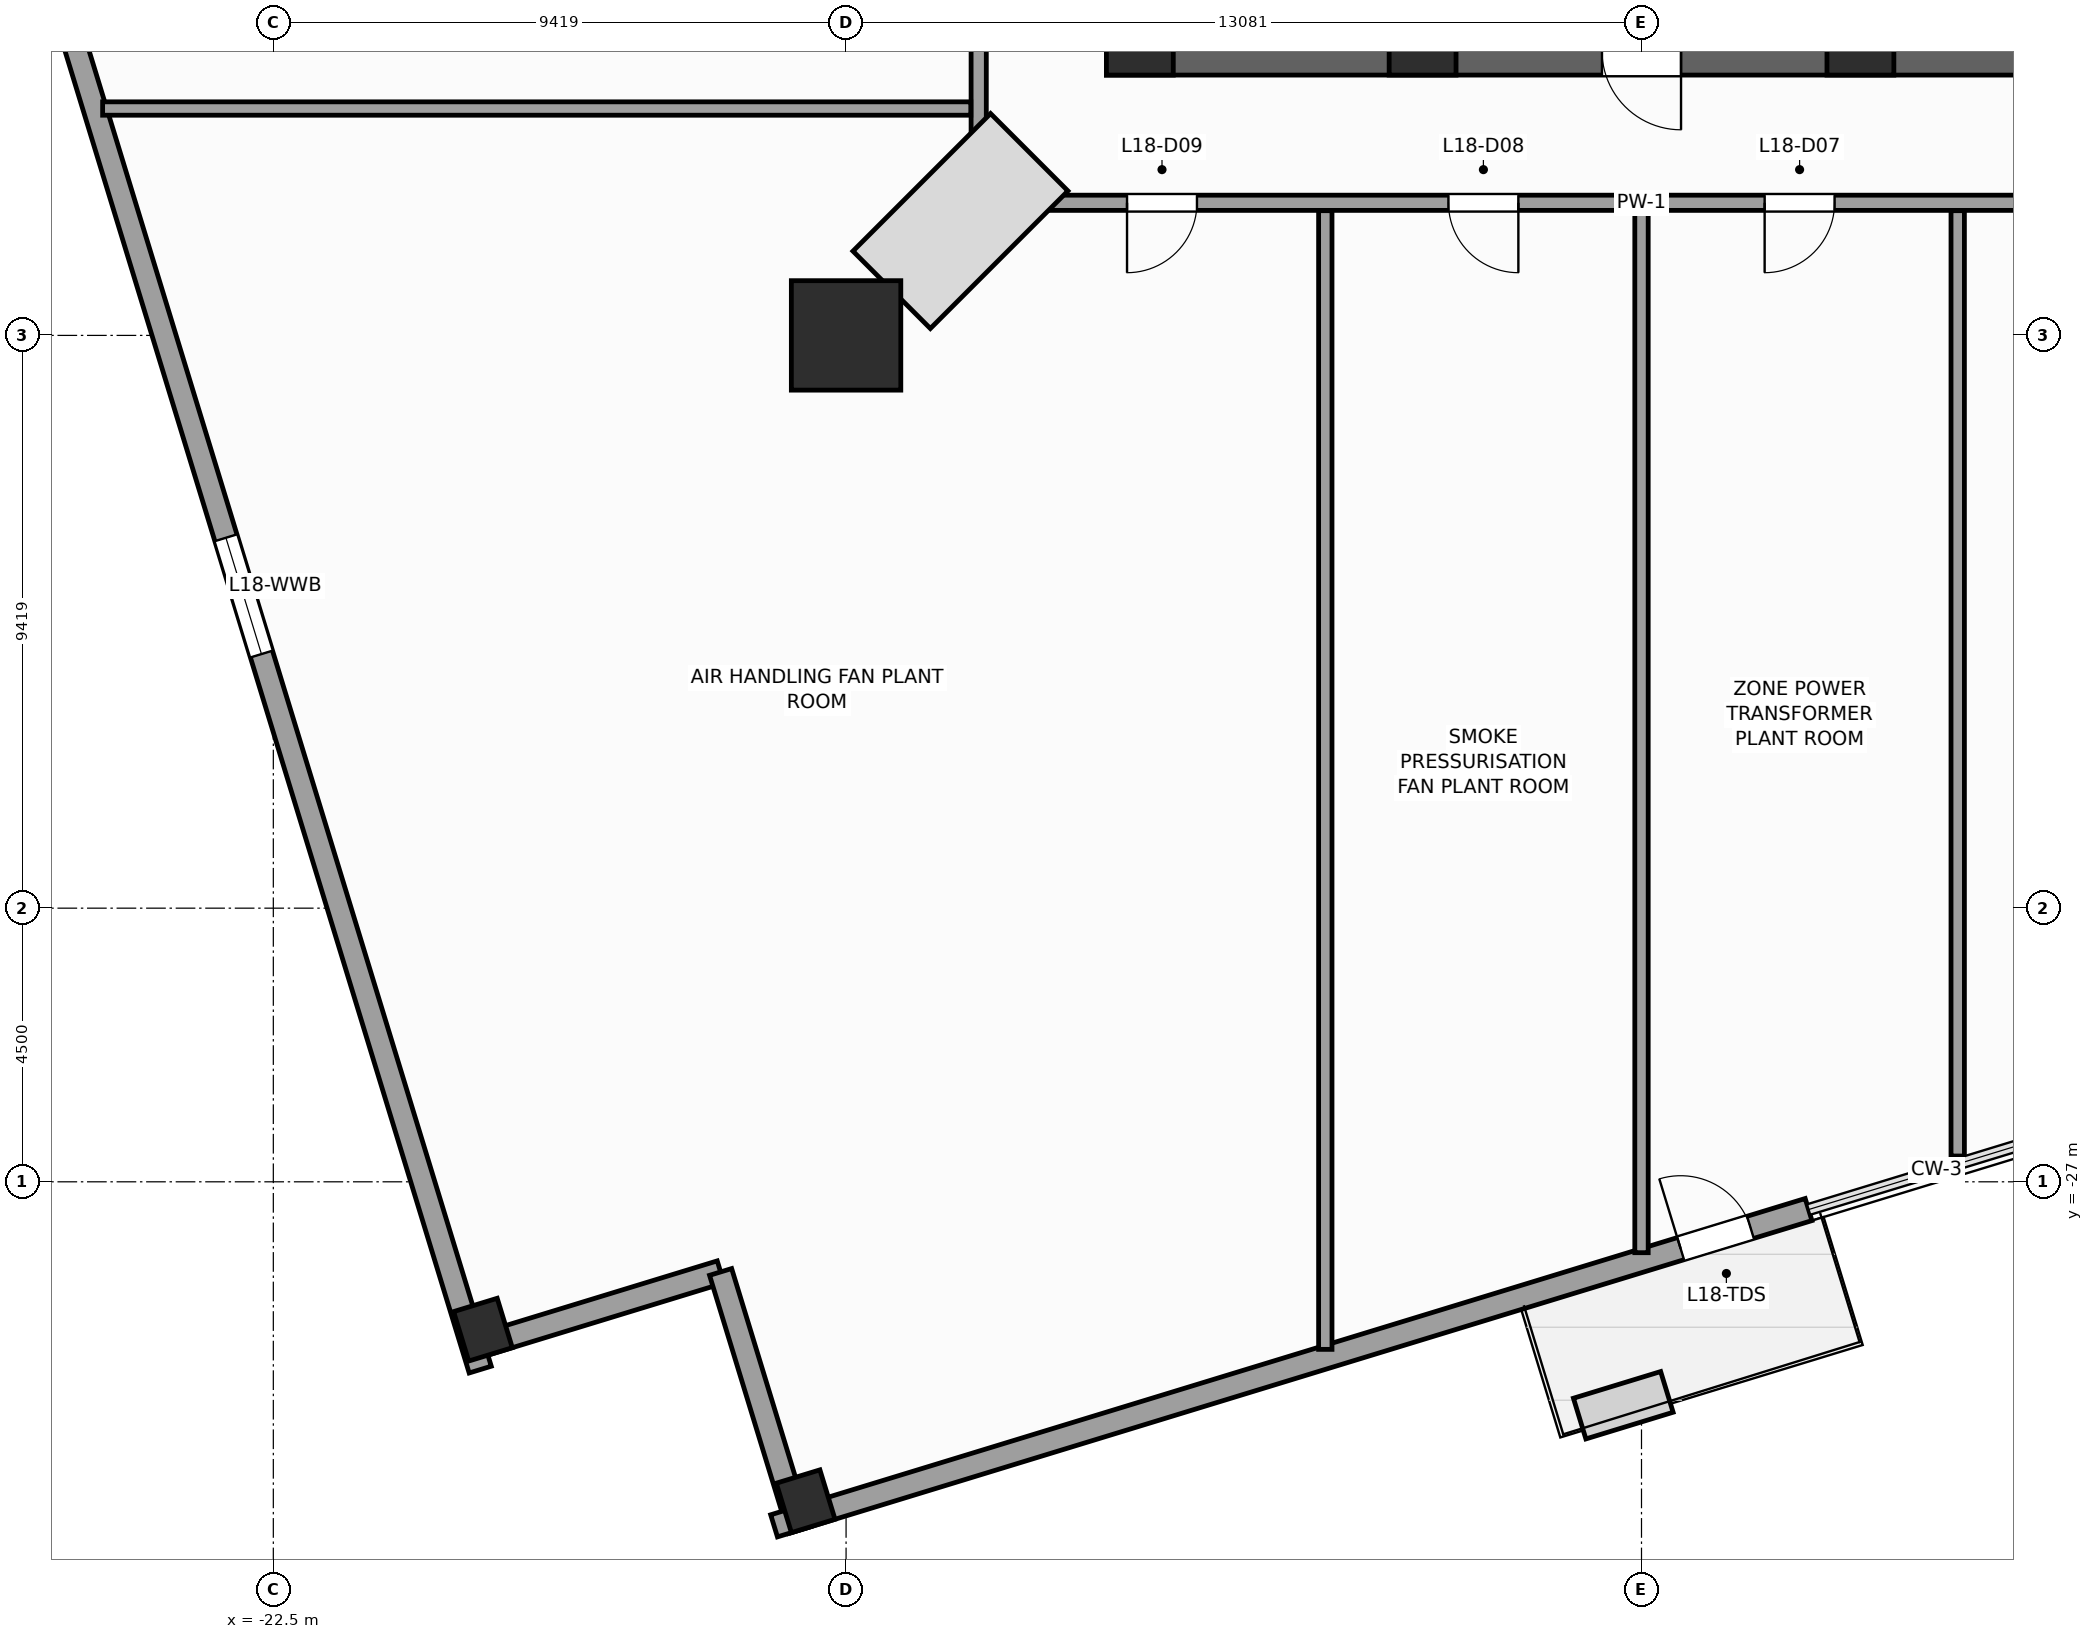
"""IFC4 building model, lengths in metres.
Left out: names, types, materials, properties, quantities, classifications, styles, units other than length and angle.
Written with IfcOpenShell. Run it as: python <this file> out.ifc"""

import sys

from ifc_helpers import new_model, si_unit, direction, frame, frame_2d, origin, origin_2d, place, context, subcontext, project, spatial, rectangle, extrude, source, transform, mapped, element, fill, save


model = new_model("IFC4")
c1 = context("Model", 3, precision=1e-05, world=origin(), true_north=direction((0.0, 1.0)))
c2 = subcontext(c1, "Body", "Model", "MODEL_VIEW")
j1 = project(units=[si_unit("LENGTHUNIT", "METRE"), si_unit("PLANEANGLEUNIT", "RADIAN")], contexts=[c1])
p1 = place(None, origin())
s1 = spatial("IfcSite", under=j1, at=p1, CompositionType="ELEMENT")
p2 = place(p1, origin())
s2 = spatial("IfcBuilding", under=s1, at=p2, CompositionType="ELEMENT")
p3 = place(p2, frame((0.0, 0.0, 78.0)))
s3 = spatial("IfcBuildingStorey", under=s2, at=p3, CompositionType="ELEMENT", Elevation=78.0)
p4 = place(p3, frame((-8.8, -8.4, 0.0), z_axis=(0.0, 0.0, 1.0), x_axis=(1.0, 0.0, 0.0)))
e1 = element("IfcWall", 1, at=p4, inside=s3, PredefinedType="SHEAR", context=c2, shape_type="SweptSolid", body=[
    extrude(rectangle(XDim=17.6, YDim=0.8, at=frame_2d((8.8, 0.0))), origin(), (0.0, 0.0, 1.0), 5.2),
])
p5 = place(p4, frame((8.15, 0.0, 0.0)))
e2 = element("IfcOpeningElement", 2, at=p5, cuts=e1, PredefinedType="OPENING", context=c2, shape_type="SweptSolid", body=[
    extrude(rectangle(XDim=1.3, YDim=2.2, at=frame_2d((0.65, 1.1))), frame((0.0, 0.41, 0.0), z_axis=(0.0, -1.0, 0.0), x_axis=(1.0, 0.0, 0.0)), (0.0, 0.0, 1.0), 0.82),
])
m1 = source(origin(), c2, "Body", "SweptSolid", [
    extrude(rectangle(XDim=1.1, YDim=1.1, at=origin_2d()), origin(), (0.0, 0.0, 1.0), 5.2),
])
for number, where, z_axis, x_axis in (
    (3, (-8.25, -8.25, 0.0), (0.0, 0.0, 1.0), (1.0, 0.0, 0.0)),
    (4, (-3.6, -8.25, 0.0), (0.0, 0.0, 1.0), (1.0, 0.0, 0.0)),
    (5, (3.6, -8.25, 0.0), (0.0, 0.0, 1.0), (1.0, 0.0, 0.0)),
):
    element("IfcColumn", number, at=place(p3, frame(where, z_axis=z_axis, x_axis=x_axis)), inside=s3, PredefinedType="PILASTER", context=c2, shape_type="MappedRepresentation", body=[
        mapped(m1, transform((0.0, 0.0, 0.0), scale=1.0)),
    ])
m2 = source(origin(), c2, "Body", "SweptSolid", [
    extrude(rectangle(XDim=1.8, YDim=1.8, at=origin_2d()), origin(), (0.0, 0.0, 1.0), 5.2),
])
p6 = place(p3, frame((-13.081, -13.081, 0.0), z_axis=(0.0, 0.0, 1.0), x_axis=(1.0, 0.0, 0.0)))
e6 = element("IfcColumn", 6, at=p6, inside=s3, PredefinedType="COLUMN", context=c2, shape_type="MappedRepresentation", body=[
    mapped(m2, transform((0.0, 0.0, 0.0), scale=1.0)),
])
m3 = source(origin(), c2, "Body", "SweptSolid", [
    extrude(rectangle(XDim=0.75, YDim=0.85, at=origin_2d()), origin(), (0.0, 0.0, 1.0), 5.2),
])
for number, where, z_axis, x_axis in (
    (7, (-13.746, -32.253, 0.0), (0.0, 0.0, 1.0), (0.956, 0.292, 0.0)),
    (8, (-19.052, -29.431, 0.0), (0.0, 0.0, 1.0), (0.956, 0.292, 0.0)),
):
    element("IfcColumn", number, at=place(p3, frame(where, z_axis=z_axis, x_axis=x_axis)), inside=s3, PredefinedType="COLUMN", context=c2, shape_type="MappedRepresentation", body=[
        mapped(m3, transform((0.0, 0.0, 0.0), scale=1.0)),
    ])
p7 = place(p3, frame((-19.208, -29.725, 0.0), z_axis=(0.0, 0.0, 1.0), x_axis=(0.956312764915, 0.292345507338, 0.0)))
e9 = element("IfcWall", 9, at=p7, inside=s3, PredefinedType="STANDARD", context=c2, shape_type="SweptSolid", body=[
    extrude(rectangle(XDim=4.25, YDim=0.38, at=frame_2d((2.125, 0.0))), origin(), (0.0, 0.0, 1.0), 4.94),
])
p8 = place(p3, frame((-15.144, -28.482, 0.0), z_axis=(0.0, 0.0, 1.0), x_axis=(0.292373601522, -0.956304176051, 0.0)))
e10 = element("IfcWall", 10, at=p8, inside=s3, PredefinedType="STANDARD", context=c2, shape_type="SweptSolid", body=[
    extrude(rectangle(XDim=4.44, YDim=0.38, at=frame_2d((2.22, 0.0))), origin(), (0.0, 0.0, 1.0), 4.24),
])
p9 = place(p3, frame((-14.265, -32.658, 0.0), z_axis=(0.0, 0.0, 1.0), x_axis=(0.956302978664, 0.292377517944, 0.0)))
e11 = element("IfcWall", 11, at=p9, inside=s3, PredefinedType="STANDARD", context=c2, shape_type="SweptSolid", body=[
    extrude(rectangle(XDim=17.79, YDim=0.38, at=frame_2d((8.895, 0.0))), origin(), (0.0, 0.0, 1.0), 4.34),
])
p10 = place(p9, frame((15.59, 0.0, 0.0)))
e12 = element("IfcOpeningElement", 12, at=p10, cuts=e11, PredefinedType="OPENING", context=c2, shape_type="SweptSolid", body=[
    extrude(rectangle(XDim=1.2, YDim=2.3, at=frame_2d((0.6, 1.15))), frame((0.0, 0.2, 0.0), z_axis=(0.0, -1.0, 0.0), x_axis=(1.0, 0.0, 0.0)), (0.0, 0.0, 1.0), 0.4),
])
p11 = place(p3, frame((-26.17, -6.955, 0.0), z_axis=(0.0, 0.0, 1.0), x_axis=(0.292372634538, -0.95630447169, 0.0)))
e13 = element("IfcWall", 13, at=p11, inside=s3, PredefinedType="STANDARD", context=c2, shape_type="SweptSolid", body=[
    extrude(rectangle(XDim=24.19, YDim=0.38, at=frame_2d((12.095, 0.0))), origin(), (0.0, 0.0, 1.0), 4.34),
])
p12 = place(p11, frame((9.885, 0.0, 0.65)))
e14 = element("IfcOpeningElement", 14, at=p12, cuts=e13, PredefinedType="OPENING", context=c2, shape_type="SweptSolid", body=[
    extrude(rectangle(XDim=2.0, YDim=1.45, at=frame_2d((1.0, 0.725))), frame((0.0, 0.2, 0.0), z_axis=(0.0, -1.0, 0.0), x_axis=(1.0, 0.0, 0.0)), (0.0, 0.0, 1.0), 0.4),
])
p13 = place(p3, frame((-10.9, -10.9, 0.0), z_axis=(0.0, 0.0, 1.0), x_axis=(1.0, 0.0, 0.0)))
e15 = element("IfcWall", 15, at=p13, inside=s3, PredefinedType="PARTITIONING", context=c2, shape_type="SweptSolid", body=[
    extrude(rectangle(XDim=21.8, YDim=0.25, at=frame_2d((10.9, 0.0))), origin(), (0.0, 0.0, 1.0), 4.94),
])
p14 = place(p13, frame((18.21, 0.0, 0.0)))
e16 = element("IfcOpeningElement", 16, at=p14, cuts=e15, PredefinedType="OPENING", context=c2, shape_type="SweptSolid", body=[
    extrude(rectangle(XDim=1.15, YDim=2.25, at=frame_2d((0.575, 1.125))), frame((0.0, 0.135, 0.0), z_axis=(0.0, -1.0, 0.0), x_axis=(1.0, 0.0, 0.0)), (0.0, 0.0, 1.0), 0.27),
])
p15 = place(p13, frame((12.925, 0.0, 0.0)))
e17 = element("IfcOpeningElement", 17, at=p15, cuts=e15, PredefinedType="OPENING", context=c2, shape_type="SweptSolid", body=[
    extrude(rectangle(XDim=1.15, YDim=2.25, at=frame_2d((0.575, 1.125))), frame((0.0, 0.135, 0.0), z_axis=(0.0, -1.0, 0.0), x_axis=(1.0, 0.0, 0.0)), (0.0, 0.0, 1.0), 0.27),
])
p16 = place(p13, frame((7.725, 0.0, 0.0)))
e18 = element("IfcOpeningElement", 18, at=p16, cuts=e15, PredefinedType="OPENING", context=c2, shape_type="SweptSolid", body=[
    extrude(rectangle(XDim=1.15, YDim=2.25, at=frame_2d((0.575, 1.125))), frame((0.0, 0.135, 0.0), z_axis=(0.0, -1.0, 0.0), x_axis=(1.0, 0.0, 0.0)), (0.0, 0.0, 1.0), 0.27),
])
p17 = place(p13, frame((2.439, 0.0, 0.0)))
e19 = element("IfcOpeningElement", 19, at=p17, cuts=e15, PredefinedType="OPENING", context=c2, shape_type="SweptSolid", body=[
    extrude(rectangle(XDim=1.15, YDim=2.25, at=frame_2d((0.575, 1.125))), frame((0.0, 0.135, 0.0), z_axis=(0.0, -1.0, 0.0), x_axis=(1.0, 0.0, 0.0)), (0.0, 0.0, 1.0), 0.27),
])
p18 = place(p3, frame((-10.9, -10.8, 0.0), z_axis=(0.0, 0.0, 1.0), x_axis=(0.0, 1.0, 0.0)))
e20 = element("IfcWall", 20, at=p18, inside=s3, PredefinedType="PARTITIONING", context=c2, shape_type="SweptSolid", body=[
    extrude(rectangle(XDim=21.6, YDim=0.25, at=frame_2d((10.8, 0.0))), origin(), (0.0, 0.0, 1.0), 4.94),
])
p19 = place(p18, frame((8.95, 0.0, 0.0)))
e21 = element("IfcOpeningElement", 21, at=p19, cuts=e20, PredefinedType="OPENING", context=c2, shape_type="SweptSolid", body=[
    extrude(rectangle(XDim=1.15, YDim=2.25, at=frame_2d((0.575, 1.125))), frame((0.0, 0.135, 0.0), z_axis=(0.0, -1.0, 0.0), x_axis=(1.0, 0.0, 0.0)), (0.0, 0.0, 1.0), 0.27),
])
p20 = place(p3, frame((-5.2, -11.03, 0.0), z_axis=(0.0, 0.0, 1.0), x_axis=(0.0, -1.0, 0.0)))
e22 = element("IfcWall", 22, at=p20, inside=s3, PredefinedType="PARTITIONING", context=c2, shape_type="SweptSolid", body=[
    extrude(rectangle(XDim=18.726, YDim=0.22, at=frame_2d((9.363, 0.0))), origin(), (0.0, 0.0, 1.0), 4.94),
])
p21 = place(p3, frame((0.0, -11.03, 0.0), z_axis=(0.0, 0.0, 1.0), x_axis=(0.0, -1.0, 0.0)))
e23 = element("IfcWall", 23, at=p21, inside=s3, PredefinedType="PARTITIONING", context=c2, shape_type="SweptSolid", body=[
    extrude(rectangle(XDim=17.136, YDim=0.22, at=frame_2d((8.568, 0.0))), origin(), (0.0, 0.0, 1.0), 4.94),
])
p22 = place(p3, frame((5.2, -11.03, 0.0), z_axis=(0.0, 0.0, 1.0), x_axis=(0.0, -1.0, 0.0)))
e24 = element("IfcWall", 24, at=p22, inside=s3, PredefinedType="PARTITIONING", context=c2, shape_type="SweptSolid", body=[
    extrude(rectangle(XDim=15.546, YDim=0.22, at=frame_2d((7.773, 0.0))), origin(), (0.0, 0.0, 1.0), 4.94),
])
p23 = place(p3, frame((-11.03, -9.35, 0.0), z_axis=(0.0, 0.0, 1.0), x_axis=(-1.0, 0.0, 0.0)))
e25 = element("IfcWall", 25, at=p23, inside=s3, PredefinedType="PARTITIONING", context=c2, shape_type="SweptSolid", body=[
    extrude(rectangle(XDim=14.277, YDim=0.22, at=frame_2d((7.139, 0.0))), origin(), (0.0, 0.0, 1.0), 4.24),
])
m4 = source(origin(), c2, "Body", "SweptSolid", [
    extrude(rectangle(XDim=2.0, YDim=1.45, at=frame_2d((1.0, 0.725))), frame((0.0, 0.03, 0.0), z_axis=(0.0, -1.0, 0.0), x_axis=(1.0, 0.0, 0.0)), (0.0, 0.0, 1.0), 0.06),
])
p24 = place(p12, origin())
e26 = element("IfcWindow", 26, at=p24, inside=s3, PartitioningType="SINGLE_PANEL", PredefinedType="WINDOW", context=c2, shape_type="MappedRepresentation", body=[
    mapped(m4, transform((0.0, 0.0, 0.0), scale=1.0)),
])
fill(e14, e26)
m5 = source(origin(), c2, "Body", "SweptSolid", [
    extrude(rectangle(XDim=1.2, YDim=2.3, at=frame_2d((0.6, 1.15))), frame((0.0, 0.025, 0.0), z_axis=(0.0, -1.0, 0.0), x_axis=(1.0, 0.0, 0.0)), (0.0, 0.0, 1.0), 0.05),
])
p25 = place(p10, origin())
e27 = element("IfcDoor", 27, at=p25, inside=s3, OperationType="SINGLE_SWING_LEFT", PredefinedType="DOOR", context=c2, shape_type="MappedRepresentation", body=[
    mapped(m5, transform((0.0, 0.0, 0.0), scale=1.0)),
])
fill(e12, e27)
m6 = source(origin(), c2, "Body", "SweptSolid", [
    extrude(rectangle(XDim=1.15, YDim=2.25, at=frame_2d((0.575, 1.125))), frame((0.0, 0.025, 0.0), z_axis=(0.0, -1.0, 0.0), x_axis=(1.0, 0.0, 0.0)), (0.0, 0.0, 1.0), 0.05),
])
p26 = place(p15, frame((1.15, 0.0, 0.0), z_axis=(0.0, 0.0, 1.0), x_axis=(-1.0, 0.0, 0.0)))
e28 = element("IfcDoor", 28, at=p26, inside=s3, OperationType="SINGLE_SWING_LEFT", PredefinedType="DOOR", context=c2, shape_type="MappedRepresentation", body=[
    mapped(m6, transform((0.0, 0.0, 0.0), scale=1.0)),
])
fill(e17, e28)
p27 = place(p16, frame((1.15, 0.0, 0.0), z_axis=(0.0, 0.0, 1.0), x_axis=(-1.0, 0.0, 0.0)))
e29 = element("IfcDoor", 29, at=p27, inside=s3, OperationType="SINGLE_SWING_RIGHT", PredefinedType="DOOR", context=c2, shape_type="MappedRepresentation", body=[
    mapped(m6, transform((0.0, 0.0, 0.0), scale=1.0)),
])
fill(e18, e29)
p28 = place(p17, frame((1.15, 0.0, 0.0), z_axis=(0.0, 0.0, 1.0), x_axis=(-1.0, 0.0, 0.0)))
e30 = element("IfcDoor", 30, at=p28, inside=s3, OperationType="SINGLE_SWING_LEFT", PredefinedType="DOOR", context=c2, shape_type="MappedRepresentation", body=[
    mapped(m6, transform((0.0, 0.0, 0.0), scale=1.0)),
])
fill(e19, e30)
save(model, sys.argv[1])
